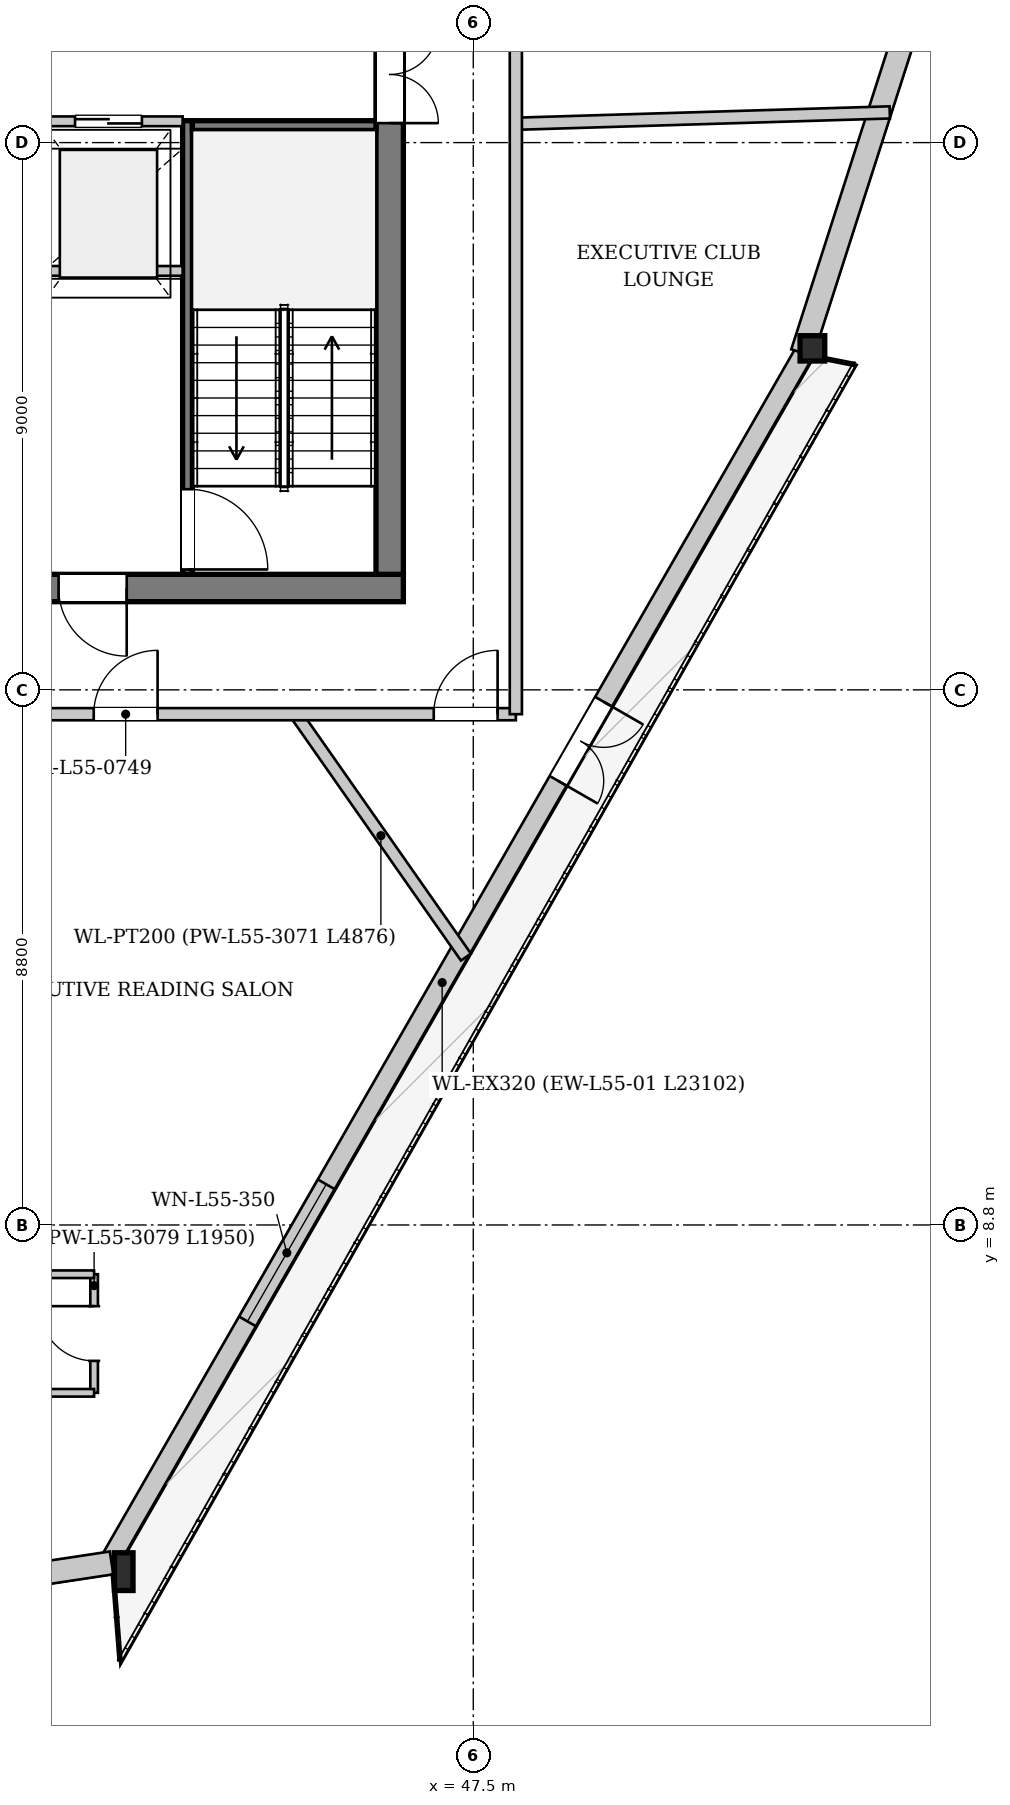
"""IFC4 building model, lengths in metres.
Left out: names, types, materials, properties, quantities, classifications, styles, units other than length and angle.
Written with IfcOpenShell. Run it as: python <this file> out.ifc"""

import sys

from ifc_helpers import new_model, si_unit, direction, frame, frame_2d, origin, origin_2d, place, context, subcontext, project, spatial, rectangle, i_section, extrude, source, transform, mapped, element, fill, save


model = new_model("IFC4")
c1 = context("Model", 3, precision=1e-05, world=origin(), true_north=direction((0.0, 1.0)))
c2 = subcontext(c1, "Body", "Model", "MODEL_VIEW")
j1 = project(units=[si_unit("LENGTHUNIT", "METRE"), si_unit("PLANEANGLEUNIT", "RADIAN")], contexts=[c1])
p1 = place(None, origin())
s1 = spatial("IfcSite", under=j1, at=p1, CompositionType="ELEMENT")
p2 = place(p1, origin())
s2 = spatial("IfcBuilding", under=s1, at=p2, CompositionType="ELEMENT")
p3 = place(p2, frame((0.0, 0.0, 209.6)))
s3 = spatial("IfcBuildingStorey", under=s2, at=p3, CompositionType="ELEMENT", Elevation=209.6)
m1 = source(origin(), c2, "Body", "SweptSolid", [
    extrude(i_section(OverallWidth=0.305, OverallDepth=0.62, WebThickness=0.021, FlangeThickness=0.04, at=origin_2d()), origin(), (0.0, 0.0, 1.0), 3.404),
])
p4 = place(p3, frame((41.58, 3.055, 0.0), z_axis=(0.100996805181, 0.026038238836, 0.994545954424), x_axis=(-0.249649213063, 0.968336341576, 0.0)))
e1 = element("IfcColumn", 1, at=p4, inside=s3, PredefinedType="COLUMN", context=c2, shape_type="MappedRepresentation", body=[
    mapped(m1, transform((0.0, 0.0, 0.0), x_axis=(1.0, 0.0, 0.0), y_axis=(0.0, 1.0, 0.0), z_axis=(0.0, 0.0, 1.0), scale=1.0)),
])
m2 = source(origin(), c2, "Body", "SweptSolid", [
    extrude(i_section(OverallWidth=0.406, OverallDepth=0.416, WebThickness=0.027, FlangeThickness=0.042, at=origin_2d()), origin(), (0.0, 0.0, 1.0), 3.395),
])
p5 = place(p3, frame((53.092, 23.084, 0.0), z_axis=(-0.008340880096, 0.07758456572, 0.996950883886), x_axis=(-0.994270743163, -0.106891015947, 0.0)))
e2 = element("IfcColumn", 2, at=p5, inside=s3, PredefinedType="COLUMN", context=c2, shape_type="MappedRepresentation", body=[
    mapped(m2, transform((0.0, 0.0, 0.0), x_axis=(1.0, 0.0, 0.0), y_axis=(0.0, 1.0, 0.0), z_axis=(0.0, 0.0, 1.0), scale=1.0)),
])
p6 = place(p3, frame((52.953, 23.164, 0.0), z_axis=(0.0, 0.0, 1.0), x_axis=(-0.498307707731, -0.867000247068, 0.0)))
e3 = element("IfcWall", 3, at=p6, inside=s3, PredefinedType="SOLIDWALL", context=c2, shape_type="SweptSolid", body=[
    extrude(rectangle(XDim=23.102, YDim=0.32, at=frame_2d((11.551, 0.0))), origin(), (0.0, 0.0, 1.0), 2.822),
])
p7 = place(p6, frame((6.643, 0.0, 0.0)))
e4 = element("IfcOpeningElement", 4, at=p7, cuts=e3, PredefinedType="OPENING", context=c2, shape_type="SweptSolid", body=[
    extrude(rectangle(XDim=1.5, YDim=2.3, at=frame_2d((0.75, 1.15))), frame((0.0, 0.17, 0.0), z_axis=(0.0, -1.0, 0.0), x_axis=(1.0, 0.0, 0.0)), (0.0, 0.0, 1.0), 0.34),
])
p8 = place(p6, frame((15.796, 0.0, 0.352)))
e5 = element("IfcOpeningElement", 5, at=p8, cuts=e3, PredefinedType="OPENING", context=c2, shape_type="SweptSolid", body=[
    extrude(rectangle(XDim=2.6, YDim=2.35, at=frame_2d((1.3, 1.175))), frame((0.0, 0.17, 0.0), z_axis=(0.0, -1.0, 0.0), x_axis=(1.0, 0.0, 0.0)), (0.0, 0.0, 1.0), 0.34),
])
p9 = place(p3, frame((41.551, 3.243, 0.0), z_axis=(0.0, 0.0, 1.0), x_axis=(-0.988756700012, -0.149533234373, 0.0)))
e6 = element("IfcWall", 6, at=p9, inside=s3, PredefinedType="SOLIDWALL", context=c2, shape_type="SweptSolid", body=[
    extrude(rectangle(XDim=3.933, YDim=0.38, at=frame_2d((1.967, 0.0))), origin(), (0.0, 0.0, 1.0), 2.822),
])
p10 = place(p3, frame((59.978, 45.137, 0.0), z_axis=(0.0, 0.0, 1.0), x_axis=(-0.305908606636, -0.95206088271, 0.0)))
e7 = element("IfcWall", 7, at=p10, inside=s3, PredefinedType="SOLIDWALL", context=c2, shape_type="SweptSolid", body=[
    extrude(rectangle(XDim=23.102, YDim=0.38, at=frame_2d((11.551, 0.0))), origin(), (0.0, 0.0, 1.0), 2.822),
])
p11 = place(p10, frame((5.869, 0.0, 0.65)))
e8 = element("IfcOpeningElement", 8, at=p11, cuts=e7, PredefinedType="OPENING", context=c2, shape_type="SweptSolid", body=[
    extrude(rectangle(XDim=1.2, YDim=1.5, at=frame_2d((0.6, 0.75))), frame((0.0, 0.2, 0.0), z_axis=(0.0, -1.0, 0.0), x_axis=(1.0, 0.0, 0.0)), (0.0, 0.0, 1.0), 0.4),
])
p12 = place(p10, frame((16.034, 0.0, 0.65)))
e9 = element("IfcOpeningElement", 9, at=p12, cuts=e7, PredefinedType="OPENING", context=c2, shape_type="SweptSolid", body=[
    extrude(rectangle(XDim=1.2, YDim=1.5, at=frame_2d((0.6, 0.75))), frame((0.0, 0.2, 0.0), z_axis=(0.0, -1.0, 0.0), x_axis=(1.0, 0.0, 0.0)), (0.0, 0.0, 1.0), 0.4),
])
p13 = place(p3, frame((46.35, 19.275, 0.0), z_axis=(0.0, 0.0, 1.0), x_axis=(-1.0, 0.0, 0.0)))
e10 = element("IfcWall", 10, at=p13, inside=s3, PredefinedType="SHEAR", context=c2, shape_type="SweptSolid", body=[
    extrude(rectangle(XDim=16.7, YDim=0.45, at=frame_2d((8.35, 0.0))), origin(), (0.0, 0.0, 1.0), 3.33),
])
p14 = place(p13, frame((4.55, 0.0, 0.0)))
e11 = element("IfcOpeningElement", 11, at=p14, cuts=e10, PredefinedType="OPENING", context=c2, shape_type="SweptSolid", body=[
    extrude(rectangle(XDim=1.12, YDim=2.25, at=frame_2d((0.56, 1.125))), frame((0.0, 0.235, 0.0), z_axis=(0.0, -1.0, 0.0), x_axis=(1.0, 0.0, 0.0)), (0.0, 0.0, 1.0), 0.47),
])
p15 = place(p13, frame((11.05, 0.0, 0.0)))
e12 = element("IfcOpeningElement", 12, at=p15, cuts=e10, PredefinedType="OPENING", context=c2, shape_type="SweptSolid", body=[
    extrude(rectangle(XDim=1.12, YDim=2.25, at=frame_2d((0.56, 1.125))), frame((0.0, 0.235, 0.0), z_axis=(0.0, -1.0, 0.0), x_axis=(1.0, 0.0, 0.0)), (0.0, 0.0, 1.0), 0.47),
])
p16 = place(p3, frame((46.125, 33.7, 0.0), z_axis=(0.0, 0.0, 1.0), x_axis=(0.0, -1.0, 0.0)))
e13 = element("IfcWall", 13, at=p16, inside=s3, PredefinedType="SHEAR", context=c2, shape_type="SweptSolid", body=[
    extrude(rectangle(XDim=14.2, YDim=0.45, at=frame_2d((7.1, 0.0))), origin(), (0.0, 0.0, 1.0), 3.33),
])
p17 = place(p16, frame((5.18, 0.0, 0.0)))
e14 = element("IfcOpeningElement", 14, at=p17, cuts=e13, PredefinedType="OPENING", context=c2, shape_type="SweptSolid", body=[
    extrude(rectangle(XDim=1.6, YDim=2.2, at=frame_2d((0.8, 1.1))), frame((0.0, 0.235, 0.0), z_axis=(0.0, -1.0, 0.0), x_axis=(1.0, 0.0, 0.0)), (0.0, 0.0, 1.0), 0.47),
])
p18 = place(p16, frame((2.05, 0.0, 0.0)))
e15 = element("IfcOpeningElement", 15, at=p18, cuts=e13, PredefinedType="OPENING", context=c2, shape_type="SweptSolid", body=[
    extrude(rectangle(XDim=0.95, YDim=2.1, at=frame_2d((0.475, 1.05))), frame((0.0, 0.235, 0.0), z_axis=(0.0, -1.0, 0.0), x_axis=(1.0, 0.0, 0.0)), (0.0, 0.0, 1.0), 0.47),
])
p19 = place(p3, frame((42.8, 26.96, 0.0), z_axis=(0.0, 0.0, 1.0), x_axis=(0.0, -1.0, 0.0)))
e16 = element("IfcWall", 16, at=p19, inside=s3, PredefinedType="PARTITIONING", context=c2, shape_type="SweptSolid", body=[
    extrude(rectangle(XDim=7.46, YDim=0.16, at=frame_2d((3.73, 0.0))), origin(), (0.0, 0.0, 1.0), 3.33),
])
p20 = place(p19, frame((6.06, 0.0, 0.0)))
e17 = element("IfcOpeningElement", 17, at=p20, cuts=e16, PredefinedType="OPENING", context=c2, shape_type="SweptSolid", body=[
    extrude(rectangle(XDim=1.32, YDim=2.2, at=frame_2d((0.66, 1.1))), frame((0.0, 0.09, 0.0), z_axis=(0.0, -1.0, 0.0), x_axis=(1.0, 0.0, 0.0)), (0.0, 0.0, 1.0), 0.18),
])
p21 = place(p3, frame((42.88, 26.88, 0.0), z_axis=(0.0, 0.0, 1.0), x_axis=(1.0, 0.0, 0.0)))
e18 = element("IfcWall", 18, at=p21, inside=s3, PredefinedType="PARTITIONING", context=c2, shape_type="SweptSolid", body=[
    extrude(rectangle(XDim=3.02, YDim=0.16, at=frame_2d((1.51, 0.0))), origin(), (0.0, 0.0, 1.0), 3.33),
])
p22 = place(p3, frame((33.28, 24.49, 0.0), z_axis=(0.0, 0.0, 1.0), x_axis=(1.0, 0.0, 0.0)))
e19 = element("IfcWall", 19, at=p22, inside=s3, PredefinedType="PARTITIONING", context=c2, shape_type="SweptSolid", body=[
    extrude(rectangle(XDim=9.44, YDim=0.16, at=frame_2d((4.72, 0.0))), origin(), (0.0, 0.0, 1.0), 3.33),
])
p23 = place(p3, frame((33.28, 26.95, 0.0), z_axis=(0.0, 0.0, 1.0), x_axis=(1.0, 0.0, 0.0)))
e20 = element("IfcWall", 20, at=p23, inside=s3, PredefinedType="PARTITIONING", context=c2, shape_type="SweptSolid", body=[
    extrude(rectangle(XDim=9.44, YDim=0.16, at=frame_2d((4.72, 0.0))), origin(), (0.0, 0.0, 1.0), 3.33),
])
p24 = place(p23, frame((1.2, 0.0, 0.0)))
e21 = element("IfcOpeningElement", 21, at=p24, cuts=e20, PredefinedType="OPENING", context=c2, shape_type="SweptSolid", body=[
    extrude(rectangle(XDim=0.95, YDim=2.1, at=frame_2d((0.475, 1.05))), frame((0.0, 0.09, 0.0), z_axis=(0.0, -1.0, 0.0), x_axis=(1.0, 0.0, 0.0)), (0.0, 0.0, 1.0), 0.18),
])
p25 = place(p23, frame((4.65, 0.0, 0.0)))
e22 = element("IfcOpeningElement", 22, at=p25, cuts=e20, PredefinedType="OPENING", context=c2, shape_type="SweptSolid", body=[
    extrude(rectangle(XDim=0.95, YDim=2.1, at=frame_2d((0.475, 1.05))), frame((0.0, 0.09, 0.0), z_axis=(0.0, -1.0, 0.0), x_axis=(1.0, 0.0, 0.0)), (0.0, 0.0, 1.0), 0.18),
])
p26 = place(p23, frame((7.67, 0.0, 0.0)))
e23 = element("IfcOpeningElement", 23, at=p26, cuts=e20, PredefinedType="OPENING", context=c2, shape_type="SweptSolid", body=[
    extrude(rectangle(XDim=1.1, YDim=2.2, at=frame_2d((0.55, 1.1))), frame((0.0, 0.09, 0.0), z_axis=(0.0, -1.0, 0.0), x_axis=(1.0, 0.0, 0.0)), (0.0, 0.0, 1.0), 0.18),
])
p27 = place(p3, frame((44.582, 17.2, 0.0), z_axis=(0.0, 0.0, 1.0), x_axis=(0.573549703619, -0.8191707621, 0.0)))
e24 = element("IfcWall", 24, at=p27, inside=s3, PredefinedType="PARTITIONING", context=c2, shape_type="SweptSolid", body=[
    extrude(rectangle(XDim=4.876, YDim=0.2, at=frame_2d((2.438, 0.0))), origin(), (0.0, 0.0, 1.0), 3.33),
])
p28 = place(p3, frame((48.2, 26.91, 0.0), z_axis=(0.0, 0.0, 1.0), x_axis=(0.999539065052, 0.030358811481, 0.0)))
e25 = element("IfcWall", 25, at=p28, inside=s3, PredefinedType="PARTITIONING", context=c2, shape_type="SweptSolid", body=[
    extrude(rectangle(XDim=6.152, YDim=0.2, at=frame_2d((3.076, 0.0))), origin(), (0.0, 0.0, 1.0), 3.33),
])
p29 = place(p3, frame((41.264, 6.04, 0.0), z_axis=(0.0, 0.0, 1.0), x_axis=(0.0, 1.0, 0.0)))
e26 = element("IfcWall", 26, at=p29, inside=s3, PredefinedType="PARTITIONING", context=c2, shape_type="SweptSolid", body=[
    extrude(rectangle(XDim=1.95, YDim=0.125, at=frame_2d((0.975, 0.0))), origin(), (0.0, 0.0, 1.0), 2.925),
])
p30 = place(p29, frame((0.525, 0.0, 0.0)))
e27 = element("IfcOpeningElement", 27, at=p30, cuts=e26, PredefinedType="OPENING", context=c2, shape_type="SweptSolid", body=[
    extrude(rectangle(XDim=0.9, YDim=2.1, at=frame_2d((0.45, 1.05))), frame((0.0, 0.073, 0.0), z_axis=(0.0, -1.0, 0.0), x_axis=(1.0, 0.0, 0.0)), (0.0, 0.0, 1.0), 0.145),
])
for number, where, z_axis, x_axis in (
    (28, (41.264, 7.99, 0.0), (0.0, 0.0, 1.0), (-1.0, 0.0, 0.0)),
    (29, (38.864, 6.04, 0.0), (0.0, 0.0, 1.0), (1.0, 0.0, 0.0)),
):
    element("IfcWall", number, at=place(p3, frame(where, z_axis=z_axis, x_axis=x_axis)), inside=s3, PredefinedType="PARTITIONING", context=c2, shape_type="SweptSolid", body=[
        extrude(rectangle(XDim=2.4, YDim=0.125, at=frame_2d((1.2, 0.0))), origin(), (0.0, 0.0, 1.0), 3.33),
    ])
p31 = place(p3, frame((27.8, 17.2, 0.0), z_axis=(0.0, 0.0, 1.0), x_axis=(1.0, 0.0, 0.0)))
e30 = element("IfcWall", 30, at=p31, inside=s3, PredefinedType="PARTITIONING", context=c2, shape_type="SweptSolid", body=[
    extrude(rectangle(XDim=20.4, YDim=0.2, at=frame_2d((10.2, 0.0))), origin(), (0.0, 0.0, 1.0), 3.33),
])
p32 = place(p31, frame((19.05, 0.0, 0.0)))
e31 = element("IfcOpeningElement", 31, at=p32, cuts=e30, PredefinedType="OPENING", context=c2, shape_type="SweptSolid", body=[
    extrude(rectangle(XDim=1.05, YDim=2.2, at=frame_2d((0.525, 1.1))), frame((0.0, 0.11, 0.0), z_axis=(0.0, -1.0, 0.0), x_axis=(1.0, 0.0, 0.0)), (0.0, 0.0, 1.0), 0.22),
])
p33 = place(p31, frame((6.236, 0.0, 0.0)))
e32 = element("IfcOpeningElement", 32, at=p33, cuts=e30, PredefinedType="OPENING", context=c2, shape_type="SweptSolid", body=[
    extrude(rectangle(XDim=1.05, YDim=2.2, at=frame_2d((0.525, 1.1))), frame((0.0, 0.11, 0.0), z_axis=(0.0, -1.0, 0.0), x_axis=(1.0, 0.0, 0.0)), (0.0, 0.0, 1.0), 0.22),
])
p34 = place(p31, frame((13.458, 0.0, 0.0)))
e33 = element("IfcOpeningElement", 33, at=p34, cuts=e30, PredefinedType="OPENING", context=c2, shape_type="SweptSolid", body=[
    extrude(rectangle(XDim=1.05, YDim=2.2, at=frame_2d((0.525, 1.1))), frame((0.0, 0.11, 0.0), z_axis=(0.0, -1.0, 0.0), x_axis=(1.0, 0.0, 0.0)), (0.0, 0.0, 1.0), 0.22),
])
p35 = place(p3, frame((48.2, 17.2, 0.0), z_axis=(0.0, 0.0, 1.0), x_axis=(0.0, 1.0, 0.0)))
e34 = element("IfcWall", 34, at=p35, inside=s3, PredefinedType="PARTITIONING", context=c2, shape_type="SweptSolid", body=[
    extrude(rectangle(XDim=18.8, YDim=0.2, at=frame_2d((9.4, 0.0))), origin(), (0.0, 0.0, 1.0), 3.33),
])
p36 = place(p35, frame((17.45, 0.0, 0.0)))
e35 = element("IfcOpeningElement", 35, at=p36, cuts=e34, PredefinedType="OPENING", context=c2, shape_type="SweptSolid", body=[
    extrude(rectangle(XDim=1.05, YDim=2.2, at=frame_2d((0.525, 1.1))), frame((0.0, 0.11, 0.0), z_axis=(0.0, -1.0, 0.0), x_axis=(1.0, 0.0, 0.0)), (0.0, 0.0, 1.0), 0.22),
])
m3 = source(origin(), c2, "Body", "SweptSolid", [
    extrude(rectangle(XDim=1.5, YDim=2.3, at=frame_2d((0.75, 1.15))), frame((0.0, 0.025, 0.0), z_axis=(0.0, -1.0, 0.0), x_axis=(1.0, 0.0, 0.0)), (0.0, 0.0, 1.0), 0.05),
])
p37 = place(p7, origin())
e36 = element("IfcDoor", 36, at=p37, inside=s3, OperationType="DOUBLE_DOOR_SINGLE_SWING", PredefinedType="DOOR", context=c2, shape_type="MappedRepresentation", body=[
    mapped(m3, transform((0.0, 0.0, 0.0), x_axis=(1.0, 0.0, 0.0), y_axis=(0.0, 1.0, 0.0), z_axis=(0.0, 0.0, 1.0), scale=1.0)),
])
fill(e4, e36)
m4 = source(origin(), c2, "Body", "SweptSolid", [
    extrude(rectangle(XDim=2.6, YDim=2.35, at=frame_2d((1.3, 1.175))), frame((0.0, 0.03, 0.0), z_axis=(0.0, -1.0, 0.0), x_axis=(1.0, 0.0, 0.0)), (0.0, 0.0, 1.0), 0.06),
])
p38 = place(p8, origin())
e37 = element("IfcWindow", 37, at=p38, inside=s3, PartitioningType="SINGLE_PANEL", PredefinedType="WINDOW", context=c2, shape_type="MappedRepresentation", body=[
    mapped(m4, transform((0.0, 0.0, 0.0), x_axis=(1.0, 0.0, 0.0), y_axis=(0.0, 1.0, 0.0), z_axis=(0.0, 0.0, 1.0), scale=1.0)),
])
fill(e5, e37)
m5 = source(origin(), c2, "Body", "SweptSolid", [
    extrude(rectangle(XDim=1.12, YDim=2.25, at=frame_2d((0.56, 1.125))), frame((0.0, 0.025, 0.0), z_axis=(0.0, -1.0, 0.0), x_axis=(1.0, 0.0, 0.0)), (0.0, 0.0, 1.0), 0.05),
])
p39 = place(p14, origin())
e38 = element("IfcDoor", 38, at=p39, inside=s3, OperationType="SINGLE_SWING_LEFT", PredefinedType="DOOR", context=c2, shape_type="MappedRepresentation", body=[
    mapped(m5, transform((0.0, 0.0, 0.0), x_axis=(1.0, 0.0, 0.0), y_axis=(0.0, 1.0, 0.0), z_axis=(0.0, 0.0, 1.0), scale=1.0)),
])
fill(e11, e38)
m6 = source(origin(), c2, "Body", "SweptSolid", [
    extrude(rectangle(XDim=1.6, YDim=2.2, at=frame_2d((0.8, 1.1))), frame((0.0, 0.025, 0.0), z_axis=(0.0, -1.0, 0.0), x_axis=(1.0, 0.0, 0.0)), (0.0, 0.0, 1.0), 0.05),
])
p40 = place(p17, origin())
e39 = element("IfcDoor", 39, at=p40, inside=s3, OperationType="DOUBLE_DOOR_SINGLE_SWING", PredefinedType="DOOR", context=c2, shape_type="MappedRepresentation", body=[
    mapped(m6, transform((0.0, 0.0, 0.0), x_axis=(1.0, 0.0, 0.0), y_axis=(0.0, 1.0, 0.0), z_axis=(0.0, 0.0, 1.0), scale=1.0)),
])
fill(e14, e39)
m7 = source(origin(), c2, "Body", "SweptSolid", [
    extrude(rectangle(XDim=1.32, YDim=2.2, at=frame_2d((0.66, 1.1))), frame((0.0, 0.025, 0.0), z_axis=(0.0, -1.0, 0.0), x_axis=(1.0, 0.0, 0.0)), (0.0, 0.0, 1.0), 0.05),
])
p41 = place(p20, origin())
e40 = element("IfcDoor", 40, at=p41, inside=s3, OperationType="SINGLE_SWING_RIGHT", PredefinedType="DOOR", context=c2, shape_type="MappedRepresentation", body=[
    mapped(m7, transform((0.0, 0.0, 0.0), x_axis=(1.0, 0.0, 0.0), y_axis=(0.0, 1.0, 0.0), z_axis=(0.0, 0.0, 1.0), scale=1.0)),
])
fill(e17, e40)
m8 = source(origin(), c2, "Body", "SweptSolid", [
    extrude(rectangle(XDim=1.1, YDim=2.2, at=frame_2d((0.55, 1.1))), frame((0.0, 0.025, 0.0), z_axis=(0.0, -1.0, 0.0), x_axis=(1.0, 0.0, 0.0)), (0.0, 0.0, 1.0), 0.05),
])
p42 = place(p26, origin())
e41 = element("IfcDoor", 41, at=p42, inside=s3, OperationType="DOUBLE_DOOR_SLIDING", PredefinedType="DOOR", context=c2, shape_type="MappedRepresentation", body=[
    mapped(m8, transform((0.0, 0.0, 0.0), x_axis=(1.0, 0.0, 0.0), y_axis=(0.0, 1.0, 0.0), z_axis=(0.0, 0.0, 1.0), scale=1.0)),
])
fill(e23, e41)
m9 = source(origin(), c2, "Body", "SweptSolid", [
    extrude(rectangle(XDim=0.9, YDim=2.1, at=frame_2d((0.45, 1.05))), frame((0.0, 0.025, 0.0), z_axis=(0.0, -1.0, 0.0), x_axis=(1.0, 0.0, 0.0)), (0.0, 0.0, 1.0), 0.05),
])
p43 = place(p30, origin())
e42 = element("IfcDoor", 42, at=p43, inside=s3, OperationType="SINGLE_SWING_RIGHT", PredefinedType="DOOR", context=c2, shape_type="MappedRepresentation", body=[
    mapped(m9, transform((0.0, 0.0, 0.0), x_axis=(1.0, 0.0, 0.0), y_axis=(0.0, 1.0, 0.0), z_axis=(0.0, 0.0, 1.0), scale=1.0)),
])
fill(e27, e42)
m10 = source(origin(), c2, "Body", "SweptSolid", [
    extrude(rectangle(XDim=1.05, YDim=2.2, at=frame_2d((0.525, 1.1))), frame((0.0, 0.025, 0.0), z_axis=(0.0, -1.0, 0.0), x_axis=(1.0, 0.0, 0.0)), (0.0, 0.0, 1.0), 0.05),
])
p44 = place(p32, origin())
e43 = element("IfcDoor", 43, at=p44, inside=s3, OperationType="SINGLE_SWING_RIGHT", PredefinedType="DOOR", context=c2, shape_type="MappedRepresentation", body=[
    mapped(m10, transform((0.0, 0.0, 0.0), x_axis=(1.0, 0.0, 0.0), y_axis=(0.0, 1.0, 0.0), z_axis=(0.0, 0.0, 1.0), scale=1.0)),
])
fill(e31, e43)
p45 = place(p34, origin())
e44 = element("IfcDoor", 44, at=p45, inside=s3, OperationType="SINGLE_SWING_RIGHT", PredefinedType="DOOR", context=c2, shape_type="MappedRepresentation", body=[
    mapped(m10, transform((0.0, 0.0, 0.0), x_axis=(1.0, 0.0, 0.0), y_axis=(0.0, 1.0, 0.0), z_axis=(0.0, 0.0, 1.0), scale=1.0)),
])
fill(e33, e44)
save(model, sys.argv[1])
